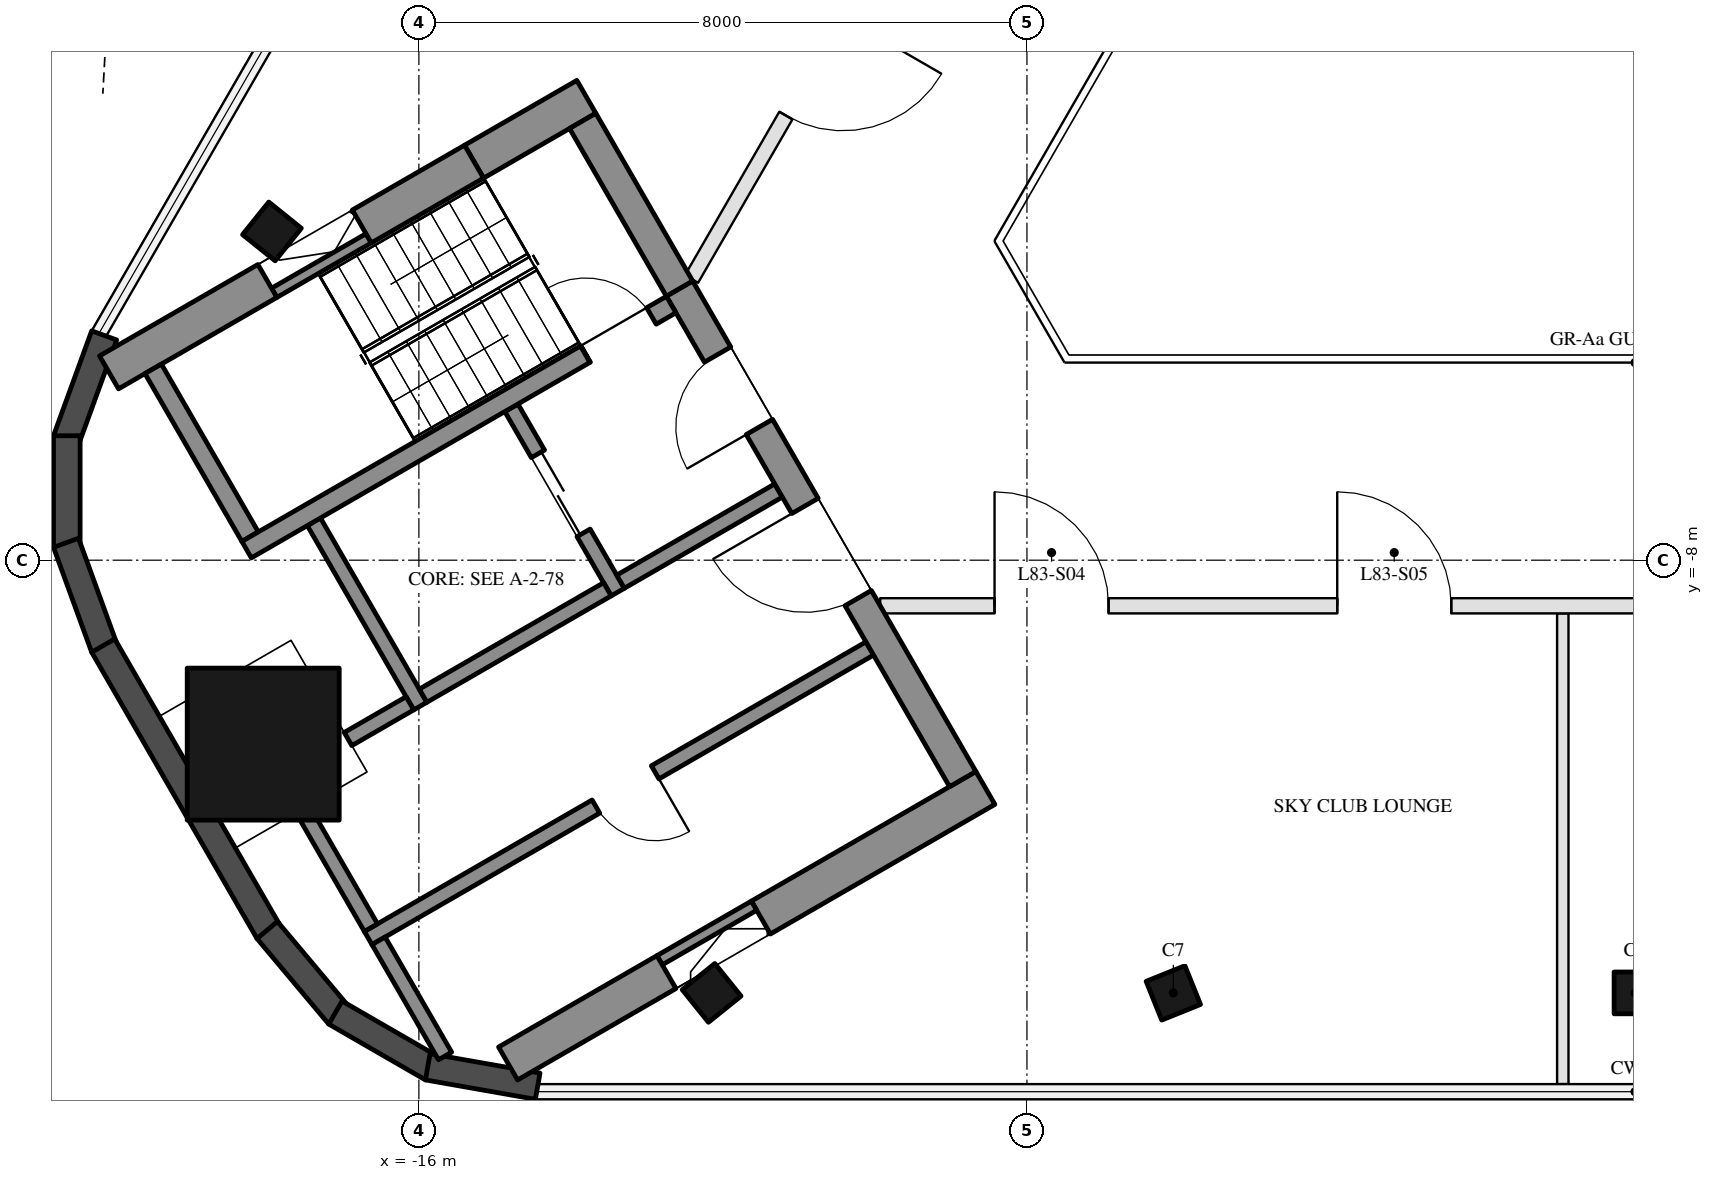
"""IFC4 building model, lengths in metres.
Left out: names, types, materials, properties, quantities, classifications, styles, units other than length and angle.
Written with IfcOpenShell. Run it as: python <this file> out.ifc"""

import sys

from ifc_helpers import new_model, si_unit, direction, frame, frame_2d, origin, origin_2d, place, context, subcontext, project, spatial, rectangle, hollow_rectangle, extrude, boolean, halfspace, element, fill, save


model = new_model("IFC4")
c1 = context("Model", 3, precision=1e-05, world=origin(), true_north=direction((0.0, 1.0)))
c2 = subcontext(c1, "Body", "Model", "MODEL_VIEW")
j1 = project(units=[si_unit("LENGTHUNIT", "METRE"), si_unit("PLANEANGLEUNIT", "RADIAN")], contexts=[c1])
p1 = place(None, origin())
s1 = spatial("IfcSite", under=j1, at=p1, CompositionType="ELEMENT")
p2 = place(p1, origin())
s2 = spatial("IfcBuilding", under=s1, at=p2, CompositionType="ELEMENT")
p3 = place(p2, frame((0.0, 0.0, 331.8)))
s3 = spatial("IfcBuildingStorey", under=s2, at=p3, CompositionType="ELEMENT", Elevation=331.8)
p4 = place(p3, frame((-12.148, -13.693, 0.0), z_axis=(0.069800876117, 0.086709858406, 0.993785307875), x_axis=(-0.997556680816, 0.003154583171, 0.069790523453)))
e1 = element("IfcColumn", 1, at=p4, inside=s3, PredefinedType="COLUMN", context=c2, shape_type="SweptSolid", body=[
    boolean("DIFFERENCE", boolean("DIFFERENCE", extrude(hollow_rectangle(XDim=0.55, YDim=0.55, WallThickness=0.025, at=origin_2d()), origin(), (0.0, 0.0, 1.0), 6.541), halfspace(frame((0.0, 0.0, 0.018), z_axis=(0.0, 0.0, 1.0), x_axis=(1.0, 0.0, 0.0)), True)), halfspace(frame((0.0, 0.0, 6.517), z_axis=(0.0, 0.0, 1.0), x_axis=(1.0, 0.0, 0.0)), False)),
])
p5 = place(p3, frame((-6.074, -13.693, 0.0), z_axis=(0.034964378571, 0.086868718097, 0.99560600543), x_axis=(-0.999387519863, 0.001602433283, 0.034957364729)))
e2 = element("IfcColumn", 2, at=p5, inside=s3, PredefinedType="COLUMN", context=c2, shape_type="SweptSolid", body=[
    boolean("DIFFERENCE", boolean("DIFFERENCE", extrude(hollow_rectangle(XDim=0.55, YDim=0.55, WallThickness=0.025, at=origin_2d()), origin(), (0.0, 0.0, 1.0), 6.529), halfspace(frame((0.0, 0.0, 0.016), z_axis=(0.0, 0.0, 1.0), x_axis=(1.0, 0.0, 0.0)), True)), halfspace(frame((0.0, 0.0, 6.509), z_axis=(0.0, 0.0, 1.0), x_axis=(1.0, 0.0, 0.0)), False)),
])
p6 = place(p3, frame((0.0, -13.693, 0.0), z_axis=(0.0, 0.086921865673, 0.996215132021), x_axis=(-1.0, 0.0, 0.0)))
e3 = element("IfcColumn", 3, at=p6, inside=s3, PredefinedType="COLUMN", context=c2, shape_type="SweptSolid", body=[
    boolean("DIFFERENCE", boolean("DIFFERENCE", extrude(hollow_rectangle(XDim=0.55, YDim=0.55, WallThickness=0.025, at=origin_2d()), origin(), (0.0, 0.0, 1.0), 6.525), halfspace(frame((0.0, 0.0, 0.015), z_axis=(0.0, 0.0, 1.0), x_axis=(1.0, 0.0, 0.0)), True)), halfspace(frame((0.0, 0.0, 6.506), z_axis=(0.0, 0.0, 1.0), x_axis=(1.0, 0.0, 0.0)), False)),
])
p7 = place(p3, frame((-17.933, -3.674, 0.0), z_axis=(0.110001598566, 0.017095599641, 0.993784377411), x_axis=(-0.496031401637, -0.865495011969, 0.069794217853)))
e4 = element("IfcColumn", 4, at=p7, inside=s3, PredefinedType="COLUMN", context=c2, shape_type="SweptSolid", body=[
    boolean("DIFFERENCE", boolean("DIFFERENCE", extrude(hollow_rectangle(XDim=0.55, YDim=0.55, WallThickness=0.025, at=origin_2d()), origin(), (0.0, 0.0, 1.0), 6.541), halfspace(frame((0.0, 0.0, 0.018), z_axis=(0.0, 0.0, 1.0), x_axis=(1.0, 0.0, 0.0)), True)), halfspace(frame((0.0, 0.0, 6.517), z_axis=(0.0, 0.0, 1.0), x_axis=(1.0, 0.0, 0.0)), False)),
])
p8 = place(p3, frame((-18.048, -10.42, 0.0), z_axis=(0.110162754727, 0.063631378111, 0.991874596504), x_axis=(0.5001252871, -0.865953057134, 6.661194e-06)))
e5 = element("IfcColumn", 5, at=p8, inside=s3, PredefinedType="COLUMN", context=c2, shape_type="SweptSolid", body=[
    boolean("DIFFERENCE", boolean("DIFFERENCE", extrude(hollow_rectangle(XDim=2.0, YDim=2.0, WallThickness=0.05, at=origin_2d()), origin(), (0.0, 0.0, 1.0), 6.553), halfspace(frame((0.0, 0.0, 0.049), z_axis=(0.0, 0.0, 1.0), x_axis=(1.0, 0.0, 0.0)), True)), halfspace(frame((0.0, 0.0, 6.487), z_axis=(0.0, 0.0, 1.0), x_axis=(1.0, 0.0, 0.0)), False)),
])
for number, where, z_axis, x_axis in (
    (6, (-20.14, -5.042, 0.0), (0.0, 0.0, 1.0), (-0.342, -0.94, 0.0)),
    (7, (-20.632, -6.363, 0.0), (0.0, 0.0, 1.0), (0.0, -1.0, 0.0)),
    (8, (-20.643, -7.771, 0.0), (0.0, 0.0, 1.0), (0.342, -0.94, 0.0)),
):
    element("IfcWall", number, at=place(p3, frame(where, z_axis=z_axis, x_axis=x_axis)), inside=s3, PredefinedType="SOLIDWALL", context=c2, shape_type="SweptSolid", body=[
        extrude(rectangle(XDim=1.469, YDim=0.35, at=frame_2d((0.734, 0.0))), origin(), (0.0, 0.0, 1.0), 6.25),
    ])
p9 = place(p3, frame((-20.153, -9.124, 0.0), z_axis=(0.0, 0.0, 1.0), x_axis=(0.500013916395, -0.866017369001, 0.0)))
e9 = element("IfcWall", 9, at=p9, inside=s3, PredefinedType="SOLIDWALL", context=c2, shape_type="SweptSolid", body=[
    extrude(rectangle(XDim=4.351, YDim=0.35, at=frame_2d((2.175, 0.0))), origin(), (0.0, 0.0, 1.0), 6.25),
])
for number, where, z_axis, x_axis in (
    (10, (-17.996, -12.866, 0.0), (0.0, 0.0, 1.0), (0.643, -0.766, 0.0)),
    (11, (-17.098, -13.952, 0.0), (0.0, 0.0, 1.0), (0.866, -0.5, 0.0)),
):
    element("IfcWall", number, at=place(p3, frame(where, z_axis=z_axis, x_axis=x_axis)), inside=s3, PredefinedType="SOLIDWALL", context=c2, shape_type="SweptSolid", body=[
        extrude(rectangle(XDim=1.469, YDim=0.35, at=frame_2d((0.734, 0.0))), origin(), (0.0, 0.0, 1.0), 6.25),
    ])
p10 = place(p3, frame((-15.883, -14.666, 0.0), z_axis=(0.0, 0.0, 1.0), x_axis=(0.984823698616, -0.173557721363, 0.0)))
e12 = element("IfcWall", 12, at=p10, inside=s3, PredefinedType="SOLIDWALL", context=c2, shape_type="SweptSolid", body=[
    extrude(rectangle(XDim=1.469, YDim=0.35, at=frame_2d((0.734, 0.0))), origin(), (0.0, 0.0, 1.0), 6.25),
])
p11 = place(p3, frame((-16.66, -3.765, 0.0), z_axis=(0.0, 0.0, 1.0), x_axis=(-0.866077922096, -0.499909024581, 0.0)))
e13 = element("IfcWall", 13, at=p11, inside=s3, PredefinedType="SHEAR", context=c2, shape_type="SweptSolid", body=[
    extrude(rectangle(XDim=1.435, YDim=0.14, at=frame_2d((0.717, 0.0))), origin(), (0.0, 0.0, 1.0), 6.25),
])
p12 = place(p3, frame((-17.993, -4.326, 0.0), z_axis=(0.0, 0.0, 1.0), x_axis=(-0.866030114221, -0.499991841196, 0.0)))
e14 = element("IfcWall", 14, at=p12, inside=s3, PredefinedType="SHEAR", context=c2, shape_type="SweptSolid", body=[
    extrude(rectangle(XDim=2.406, YDim=0.5, at=frame_2d((1.203, 0.0))), origin(), (0.0, 0.0, 1.0), 6.25),
])
p13 = place(p3, frame((-8.547, -10.997, 0.0), z_axis=(0.0, 0.0, 1.0), x_axis=(-0.866036589769, -0.499980624807, 0.0)))
e15 = element("IfcWall", 15, at=p13, inside=s3, PredefinedType="SHEAR", context=c2, shape_type="SweptSolid", body=[
    extrude(rectangle(XDim=3.411, YDim=0.5, at=frame_2d((1.706, 0.0))), origin(), (0.0, 0.0, 1.0), 6.25),
])
p14 = place(p3, frame((-11.59, -12.546, 0.0), z_axis=(0.0, 0.0, 1.0), x_axis=(-0.866077922096, -0.499909024581, 0.0)))
e16 = element("IfcWall", 16, at=p14, inside=s3, PredefinedType="SHEAR", context=c2, shape_type="SweptSolid", body=[
    extrude(rectangle(XDim=1.435, YDim=0.14, at=frame_2d((0.717, 0.0))), origin(), (0.0, 0.0, 1.0), 6.25),
])
p15 = place(p3, frame((-12.743, -13.419, 0.0), z_axis=(0.0, 0.0, 1.0), x_axis=(-0.866055480043, -0.499947902773, 0.0)))
e17 = element("IfcWall", 17, at=p15, inside=s3, PredefinedType="SHEAR", context=c2, shape_type="SweptSolid", body=[
    extrude(rectangle(XDim=2.406, YDim=0.5, at=frame_2d((1.203, 0.0))), origin(), (0.0, 0.0, 1.0), 6.25),
])
p16 = place(p3, frame((-19.496, -5.482, 0.0), z_axis=(0.0, 0.0, 1.0), x_axis=(0.499990435942, -0.866030925526, 0.0)))
e18 = element("IfcWall", 18, at=p16, inside=s3, PredefinedType="SHEAR", context=c2, shape_type="SweptSolid", body=[
    extrude(rectangle(XDim=2.55, YDim=0.25, at=frame_2d((1.275, 0.0))), origin(), (0.0, 0.0, 1.0), 6.25),
])
p17 = place(p3, frame((-17.381, -7.495, 0.0), z_axis=(0.0, 0.0, 1.0), x_axis=(0.500011755427, -0.866018616679, 0.0)))
e19 = element("IfcWall", 19, at=p17, inside=s3, PredefinedType="SHEAR", context=c2, shape_type="SweptSolid", body=[
    extrude(rectangle(XDim=2.8, YDim=0.2, at=frame_2d((1.4, 0.0))), origin(), (0.0, 0.0, 1.0), 6.25),
])
p18 = place(p3, frame((-14.783, -5.995, 0.0), z_axis=(0.0, 0.0, 1.0), x_axis=(0.49994636267, -0.866056369097, 0.0)))
e20 = element("IfcWall", 20, at=p18, inside=s3, PredefinedType="SHEAR", context=c2, shape_type="SweptSolid", body=[
    extrude(rectangle(XDim=2.8, YDim=0.2, at=frame_2d((1.4, 0.0))), origin(), (0.0, 0.0, 1.0), 6.25),
])
p19 = place(p18, frame((0.7, 0.0, 0.0)))
e21 = element("IfcOpeningElement", 21, at=p19, cuts=e20, PredefinedType="OPENING", context=c2, shape_type="SweptSolid", body=[
    extrude(rectangle(XDim=1.2, YDim=2.1, at=frame_2d((0.6, 1.05))), frame((0.0, 0.11, 0.0), z_axis=(0.0, -1.0, 0.0), x_axis=(1.0, 0.0, 0.0)), (0.0, 0.0, 1.0), 0.22),
])
p20 = place(p3, frame((-13.52, -8.383, 0.0), z_axis=(0.0, 0.0, 1.0), x_axis=(-0.866034573852, -0.49998411664, 0.0)))
e22 = element("IfcWall", 22, at=p20, inside=s3, PredefinedType="SHEAR", context=c2, shape_type="SweptSolid", body=[
    extrude(rectangle(XDim=2.8, YDim=0.2, at=frame_2d((1.4, 0.0))), origin(), (0.0, 0.0, 1.0), 6.25),
])
p21 = place(p3, frame((-11.268, -7.083, 0.0), z_axis=(0.0, 0.0, 1.0), x_axis=(-0.866050077142, -0.499957262057, 0.0)))
e23 = element("IfcWall", 23, at=p21, inside=s3, PredefinedType="SHEAR", context=c2, shape_type="SweptSolid", body=[
    extrude(rectangle(XDim=2.4, YDim=0.2, at=frame_2d((1.2, 0.0))), origin(), (0.0, 0.0, 1.0), 6.25),
])
p22 = place(p3, frame((-10.068, -9.162, 0.0), z_axis=(0.0, 0.0, 1.0), x_axis=(-0.866036194175, -0.49998131003, 0.0)))
e24 = element("IfcWall", 24, at=p22, inside=s3, PredefinedType="SHEAR", context=c2, shape_type="SweptSolid", body=[
    extrude(rectangle(XDim=7.62, YDim=0.2, at=frame_2d((3.81, 0.0))), origin(), (0.0, 0.0, 1.0), 6.25),
])
p23 = place(p22, frame((3.26, 0.0, 0.0)))
e25 = element("IfcOpeningElement", 25, at=p23, cuts=e24, PredefinedType="OPENING", context=c2, shape_type="SweptSolid", body=[
    extrude(rectangle(XDim=0.9, YDim=2.1, at=frame_2d((0.45, 1.05))), frame((0.0, 0.11, 0.0), z_axis=(0.0, -1.0, 0.0), x_axis=(1.0, 0.0, 0.0)), (0.0, 0.0, 1.0), 0.22),
])
p24 = place(p3, frame((-17.531, -11.276, 0.0), z_axis=(0.0, 0.0, 1.0), x_axis=(0.499902469156, -0.866081705922, 0.0)))
e26 = element("IfcWall", 26, at=p24, inside=s3, PredefinedType="SHEAR", context=c2, shape_type="SweptSolid", body=[
    extrude(rectangle(XDim=1.8, YDim=0.2, at=frame_2d((0.9, 0.0))), origin(), (0.0, 0.0, 1.0), 6.25),
])
p25 = place(p3, frame((-16.118, -9.883, 0.0), z_axis=(0.0, 0.0, 1.0), x_axis=(-0.8660774803, -0.499909789979, 0.0)))
e27 = element("IfcWall", 27, at=p25, inside=s3, PredefinedType="SHEAR", context=c2, shape_type="SweptSolid", body=[
    extrude(rectangle(XDim=0.94, YDim=0.2, at=frame_2d((0.47, 0.0))), origin(), (0.0, 0.0, 1.0), 6.25),
])
p26 = place(p3, frame((-16.531, -13.008, 0.0), z_axis=(0.0, 0.0, 1.0), x_axis=(0.499875430091, -0.86609731231, 0.0)))
e28 = element("IfcWall", 28, at=p26, inside=s3, PredefinedType="SHEAR", context=c2, shape_type="SweptSolid", body=[
    extrude(rectangle(XDim=1.75, YDim=0.2, at=frame_2d((0.875, 0.0))), origin(), (0.0, 0.0, 1.0), 6.25),
])
p27 = place(p3, frame((-13.797, -1.903, 0.0), z_axis=(0.0, 0.0, 1.0), x_axis=(-0.866033076574, -0.499986710104, 0.0)))
e29 = element("IfcWall", 29, at=p27, inside=s3, PredefinedType="SHEAR", context=c2, shape_type="SweptSolid", body=[
    extrude(rectangle(XDim=1.706, YDim=0.5, at=frame_2d((0.853, 0.0))), origin(), (0.0, 0.0, 1.0), 6.25),
])
p28 = place(p3, frame((-15.274, -2.756, 0.0), z_axis=(0.0, 0.0, 1.0), x_axis=(-0.866040105854, -0.499974534403, 0.0)))
e30 = element("IfcWall", 30, at=p28, inside=s3, PredefinedType="SHEAR", context=c2, shape_type="SweptSolid", body=[
    extrude(rectangle(XDim=1.705, YDim=0.5, at=frame_2d((0.852, 0.0))), origin(), (0.0, 0.0, 1.0), 6.25),
])
p29 = place(p3, frame((-13.845, -2.22, 0.0), z_axis=(0.0, 0.0, 1.0), x_axis=(0.500062241894, -0.865989465428, 0.0)))
e31 = element("IfcWall", 31, at=p29, inside=s3, PredefinedType="SHEAR", context=c2, shape_type="SweptSolid", body=[
    extrude(rectangle(XDim=2.55, YDim=0.4, at=frame_2d((1.275, 0.0))), origin(), (0.0, 0.0, 1.0), 6.25),
])
p30 = place(p3, frame((-12.57, -4.428, 0.0), z_axis=(0.0, 0.0, 1.0), x_axis=(0.499984378957, -0.86603442241, 0.0)))
e32 = element("IfcWall", 32, at=p30, inside=s3, PredefinedType="SHEAR", context=c2, shape_type="SweptSolid", body=[
    extrude(rectangle(XDim=7.45, YDim=0.4, at=frame_2d((3.725, 0.0))), origin(), (0.0, 0.0, 1.0), 6.25),
])
p31 = place(p30, frame((1.0, 0.0, 0.0)))
e33 = element("IfcOpeningElement", 33, at=p31, cuts=e32, PredefinedType="OPENING", context=c2, shape_type="SweptSolid", body=[
    extrude(rectangle(XDim=1.1, YDim=2.1, at=frame_2d((0.55, 1.05))), frame((0.0, 0.21, 0.0), z_axis=(0.0, -1.0, 0.0), x_axis=(1.0, 0.0, 0.0)), (0.0, 0.0, 1.0), 0.42),
])
p32 = place(p30, frame((3.3, 0.0, 0.0)))
e34 = element("IfcOpeningElement", 34, at=p32, cuts=e32, PredefinedType="OPENING", context=c2, shape_type="SweptSolid", body=[
    extrude(rectangle(XDim=1.4, YDim=2.1, at=frame_2d((0.7, 1.05))), frame((0.0, 0.21, 0.0), z_axis=(0.0, -1.0, 0.0), x_axis=(1.0, 0.0, 0.0)), (0.0, 0.0, 1.0), 0.42),
])
p33 = place(p3, frame((-12.681, -4.636, 0.0), z_axis=(0.0, 0.0, 1.0), x_axis=(-0.86601437931, -0.500019094464, 0.0)))
e35 = element("IfcWall", 35, at=p33, inside=s3, PredefinedType="SHEAR", context=c2, shape_type="SweptSolid", body=[
    extrude(rectangle(XDim=1.306, YDim=0.25, at=frame_2d((0.653, 0.0))), origin(), (0.0, 0.0, 1.0), 6.25),
])
p34 = place(p33, frame((0.3, 0.0, 0.0)))
e36 = element("IfcOpeningElement", 36, at=p34, cuts=e35, PredefinedType="OPENING", context=c2, shape_type="SweptSolid", body=[
    extrude(rectangle(XDim=1.0, YDim=2.1, at=frame_2d((0.5, 1.05))), frame((0.0, 0.135, 0.0), z_axis=(0.0, -1.0, 0.0), x_axis=(1.0, 0.0, 0.0)), (0.0, 0.0, 1.0), 0.27),
])
p35 = place(p3, frame((-13.812, -5.29, 0.0), z_axis=(0.0, 0.0, 1.0), x_axis=(-0.866023561601, -0.500003190742, 0.0)))
e37 = element("IfcWall", 37, at=p35, inside=s3, PredefinedType="SHEAR", context=c2, shape_type="SweptSolid", body=[
    extrude(rectangle(XDim=5.144, YDim=0.25, at=frame_2d((2.572, 0.0))), origin(), (0.0, 0.0, 1.0), 6.25),
])
p36 = place(p3, frame((-0.95, -14.893, 0.0), z_axis=(0.0, 0.0, 1.0), x_axis=(0.0, 1.0, 0.0)))
e38 = element("IfcWall", 38, at=p36, inside=s3, PredefinedType="PARTITIONING", context=c2, shape_type="SweptSolid", body=[
    extrude(rectangle(XDim=6.193, YDim=0.15, at=frame_2d((3.097, 0.0))), origin(), (0.0, 0.0, 1.0), 5.85),
])
p37 = place(p3, frame((-9.93, -8.6, 0.0), z_axis=(0.0, 0.0, 1.0), x_axis=(1.0, 0.0, 0.0)))
e39 = element("IfcWall", 39, at=p37, inside=s3, PredefinedType="PARTITIONING", context=c2, shape_type="SweptSolid", body=[
    extrude(rectangle(XDim=19.861, YDim=0.2, at=frame_2d((9.93, 0.0))), origin(), (0.0, 0.0, 1.0), 5.85),
])
p38 = place(p37, frame((1.504, 0.0, 0.0)))
e40 = element("IfcOpeningElement", 40, at=p38, cuts=e39, PredefinedType="OPENING", context=c2, shape_type="SweptSolid", body=[
    extrude(rectangle(XDim=1.5, YDim=2.1, at=frame_2d((0.75, 1.05))), frame((0.0, 0.11, 0.0), z_axis=(0.0, -1.0, 0.0), x_axis=(1.0, 0.0, 0.0)), (0.0, 0.0, 1.0), 0.22),
])
p39 = place(p37, frame((6.013, 0.0, 0.0)))
e41 = element("IfcOpeningElement", 41, at=p39, cuts=e39, PredefinedType="OPENING", context=c2, shape_type="SweptSolid", body=[
    extrude(rectangle(XDim=1.5, YDim=2.1, at=frame_2d((0.75, 1.05))), frame((0.0, 0.11, 0.0), z_axis=(0.0, -1.0, 0.0), x_axis=(1.0, 0.0, 0.0)), (0.0, 0.0, 1.0), 0.22),
])
p40 = place(p37, frame((13.643, 0.0, 0.0)))
e42 = element("IfcOpeningElement", 42, at=p40, cuts=e39, PredefinedType="OPENING", context=c2, shape_type="SweptSolid", body=[
    extrude(rectangle(XDim=1.2, YDim=2.1, at=frame_2d((0.6, 1.05))), frame((0.0, 0.11, 0.0), z_axis=(0.0, -1.0, 0.0), x_axis=(1.0, 0.0, 0.0)), (0.0, 0.0, 1.0), 0.22),
])
p41 = place(p3, frame((-2.482, 12.9, 0.0), z_axis=(0.0, 0.0, 1.0), x_axis=(-0.50000478328, -0.866022642139, 0.0)))
e43 = element("IfcWall", 43, at=p41, inside=s3, PredefinedType="PARTITIONING", context=c2, shape_type="SweptSolid", body=[
    extrude(rectangle(XDim=19.861, YDim=0.2, at=frame_2d((9.931, 0.0))), origin(), (0.0, 0.0, 1.0), 5.85),
])
p42 = place(p41, frame((2.634, 0.0, 0.0)))
e44 = element("IfcOpeningElement", 44, at=p42, cuts=e43, PredefinedType="OPENING", context=c2, shape_type="SweptSolid", body=[
    extrude(rectangle(XDim=1.2, YDim=2.1, at=frame_2d((0.6, 1.05))), frame((0.0, 0.11, 0.0), z_axis=(0.0, -1.0, 0.0), x_axis=(1.0, 0.0, 0.0)), (0.0, 0.0, 1.0), 0.22),
])
p43 = place(p41, frame((15.877, 0.0, 0.0)))
e45 = element("IfcOpeningElement", 45, at=p43, cuts=e43, PredefinedType="OPENING", context=c2, shape_type="SweptSolid", body=[
    extrude(rectangle(XDim=1.5, YDim=2.1, at=frame_2d((0.75, 1.05))), frame((0.0, 0.11, 0.0), z_axis=(0.0, -1.0, 0.0), x_axis=(1.0, 0.0, 0.0)), (0.0, 0.0, 1.0), 0.22),
])
p44 = place(p41, frame((9.43, 0.0, 0.0)))
e46 = element("IfcOpeningElement", 46, at=p44, cuts=e43, PredefinedType="OPENING", context=c2, shape_type="SweptSolid", body=[
    extrude(rectangle(XDim=1.0, YDim=2.1, at=frame_2d((0.5, 1.05))), frame((0.0, 0.11, 0.0), z_axis=(0.0, -1.0, 0.0), x_axis=(1.0, 0.0, 0.0)), (0.0, 0.0, 1.0), 0.22),
])
p45 = place(p19, origin())
e47 = element("IfcDoor", 47, at=p45, inside=s3, OperationType="DOUBLE_DOOR_SLIDING", PredefinedType="DOOR", context=c2, shape_type="SweptSolid", body=[
    extrude(rectangle(XDim=1.2, YDim=2.1, at=frame_2d((0.6, 1.05))), frame((0.0, 0.025, 0.0), z_axis=(0.0, -1.0, 0.0), x_axis=(1.0, 0.0, 0.0)), (0.0, 0.0, 1.0), 0.05),
])
fill(e21, e47)
p46 = place(p23, origin())
e48 = element("IfcDoor", 48, at=p46, inside=s3, OperationType="SINGLE_SWING_LEFT", PredefinedType="DOOR", context=c2, shape_type="SweptSolid", body=[
    extrude(rectangle(XDim=0.9, YDim=2.1, at=frame_2d((0.45, 1.05))), frame((0.0, 0.025, 0.0), z_axis=(0.0, -1.0, 0.0), x_axis=(1.0, 0.0, 0.0)), (0.0, 0.0, 1.0), 0.05),
])
fill(e25, e48)
p47 = place(p31, frame((1.1, 0.0, 0.0), z_axis=(0.0, 0.0, 1.0), x_axis=(-1.0, 0.0, 0.0)))
e49 = element("IfcDoor", 49, at=p47, inside=s3, OperationType="SINGLE_SWING_LEFT", PredefinedType="DOOR", context=c2, shape_type="SweptSolid", body=[
    extrude(rectangle(XDim=1.1, YDim=2.1, at=frame_2d((0.55, 1.05))), frame((0.0, 0.025, 0.0), z_axis=(0.0, -1.0, 0.0), x_axis=(1.0, 0.0, 0.0)), (0.0, 0.0, 1.0), 0.05),
])
fill(e33, e49)
p48 = place(p32, frame((1.4, 0.0, 0.0), z_axis=(0.0, 0.0, 1.0), x_axis=(-1.0, 0.0, 0.0)))
e50 = element("IfcDoor", 50, at=p48, inside=s3, OperationType="DOUBLE_DOOR_SINGLE_SWING", PredefinedType="DOOR", context=c2, shape_type="SweptSolid", body=[
    extrude(rectangle(XDim=1.4, YDim=2.1, at=frame_2d((0.7, 1.05))), frame((0.0, 0.025, 0.0), z_axis=(0.0, -1.0, 0.0), x_axis=(1.0, 0.0, 0.0)), (0.0, 0.0, 1.0), 0.05),
])
fill(e34, e50)
p49 = place(p34, frame((1.0, 0.0, 0.0), z_axis=(0.0, 0.0, 1.0), x_axis=(-1.0, 0.0, 0.0)))
e51 = element("IfcDoor", 51, at=p49, inside=s3, OperationType="SINGLE_SWING_LEFT", PredefinedType="DOOR", context=c2, shape_type="SweptSolid", body=[
    extrude(rectangle(XDim=1.0, YDim=2.1, at=frame_2d((0.5, 1.05))), frame((0.0, 0.025, 0.0), z_axis=(0.0, -1.0, 0.0), x_axis=(1.0, 0.0, 0.0)), (0.0, 0.0, 1.0), 0.05),
])
fill(e36, e51)
p50 = place(p38, origin())
e52 = element("IfcDoor", 52, at=p50, inside=s3, OperationType="DOUBLE_DOOR_SINGLE_SWING", PredefinedType="DOOR", context=c2, shape_type="SweptSolid", body=[
    extrude(rectangle(XDim=1.5, YDim=2.1, at=frame_2d((0.75, 1.05))), frame((0.0, 0.025, 0.0), z_axis=(0.0, -1.0, 0.0), x_axis=(1.0, 0.0, 0.0)), (0.0, 0.0, 1.0), 0.05),
])
fill(e40, e52)
p51 = place(p39, origin())
e53 = element("IfcDoor", 53, at=p51, inside=s3, OperationType="DOUBLE_DOOR_SINGLE_SWING", PredefinedType="DOOR", context=c2, shape_type="SweptSolid", body=[
    extrude(rectangle(XDim=1.5, YDim=2.1, at=frame_2d((0.75, 1.05))), frame((0.0, 0.025, 0.0), z_axis=(0.0, -1.0, 0.0), x_axis=(1.0, 0.0, 0.0)), (0.0, 0.0, 1.0), 0.05),
])
fill(e41, e53)
p52 = place(p43, origin())
e54 = element("IfcDoor", 54, at=p52, inside=s3, OperationType="DOUBLE_DOOR_SINGLE_SWING", PredefinedType="DOOR", context=c2, shape_type="SweptSolid", body=[
    extrude(rectangle(XDim=1.5, YDim=2.1, at=frame_2d((0.75, 1.05))), frame((0.0, 0.025, 0.0), z_axis=(0.0, -1.0, 0.0), x_axis=(1.0, 0.0, 0.0)), (0.0, 0.0, 1.0), 0.05),
])
fill(e45, e54)
save(model, sys.argv[1])
